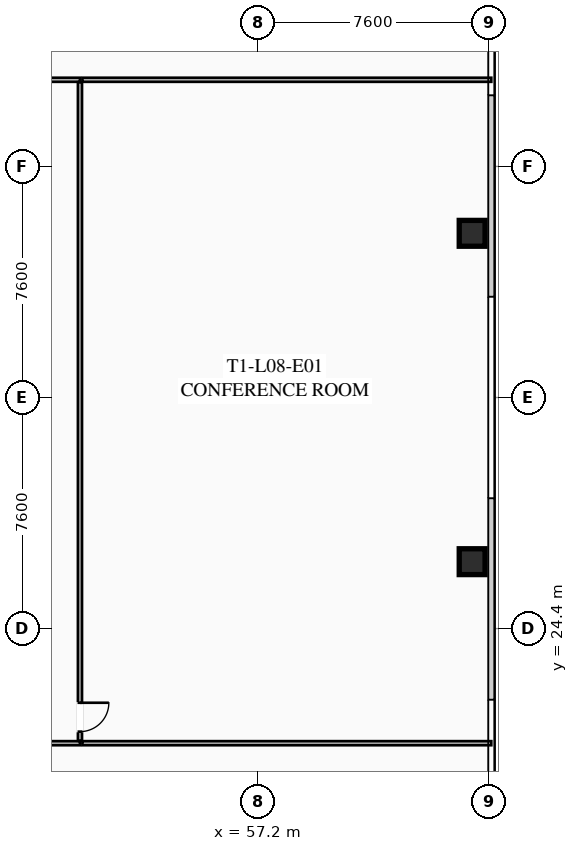
"""IFC4 building model, lengths in metres.
Left out: names, types, materials, properties, quantities, classifications, styles, units other than length and angle.
Written with IfcOpenShell. Run it as: python <this file> out.ifc"""

import sys

from ifc_helpers import new_model, si_unit, direction, frame, frame_2d, origin, origin_2d, place, context, subcontext, project, spatial, rectangle, hollow_rectangle, extrude, element, fill, save


model = new_model("IFC4")
c1 = context("Model", 3, precision=1e-05, world=origin(), true_north=direction((0.0, 1.0)))
c2 = subcontext(c1, "Body", "Model", "MODEL_VIEW")
j1 = project(units=[si_unit("LENGTHUNIT", "METRE"), si_unit("PLANEANGLEUNIT", "RADIAN")], contexts=[c1])
p1 = place(None, origin())
s1 = spatial("IfcSite", under=j1, at=p1, CompositionType="ELEMENT")
p2 = place(p1, origin())
s2 = spatial("IfcBuilding", under=s1, at=p2, CompositionType="ELEMENT")
p3 = place(p2, frame((0.0, 0.0, 35.25)))
s3 = spatial("IfcBuildingStorey", under=s2, at=p3, CompositionType="ELEMENT", Elevation=35.25)
for number, where, z_axis, x_axis in (
    (1, (64.25, 26.6, 0.0), (0.0, 0.0, 1.0), (1.0, 0.0, 0.0)),
    (2, (64.25, 37.4, 0.0), (0.0, 0.0, 1.0), (1.0, 0.0, 0.0)),
):
    element("IfcColumn", number, at=place(p3, frame(where, z_axis=z_axis, x_axis=x_axis)), inside=s3, PredefinedType="COLUMN", context=c2, shape_type="SweptSolid", body=[
        extrude(hollow_rectangle(XDim=0.85, YDim=0.85, WallThickness=0.035, at=origin_2d()), origin(), (0.0, 0.0, 1.0), 3.35),
    ])
p4 = place(p3, frame((22.35, 42.45, 0.0), z_axis=(0.0, 0.0, 1.0), x_axis=(1.0, 0.0, 0.0)))
e3 = element("IfcWall", 3, at=p4, inside=s3, PredefinedType="PARTITIONING", context=c2, shape_type="SweptSolid", body=[
    extrude(rectangle(XDim=29.0, YDim=0.135, at=frame_2d((14.5, 0.0))), origin(), (0.0, 0.0, 1.0), 2.703),
])
p5 = place(p4, frame((0.3, 0.0, 0.0)))
e4 = element("IfcOpeningElement", 4, at=p5, cuts=e3, PredefinedType="OPENING", context=c2, shape_type="SweptSolid", body=[
    extrude(rectangle(XDim=0.95, YDim=2.05, at=frame_2d((0.475, 1.025))), frame((0.0, 0.077, 0.0), z_axis=(0.0, -1.0, 0.0), x_axis=(1.0, 0.0, 0.0)), (0.0, 0.0, 1.0), 0.155),
])
p6 = place(p4, frame((19.12, 0.0, 0.0)))
e5 = element("IfcOpeningElement", 5, at=p6, cuts=e3, PredefinedType="OPENING", context=c2, shape_type="SweptSolid", body=[
    extrude(rectangle(XDim=0.95, YDim=2.05, at=frame_2d((0.475, 1.025))), frame((0.0, 0.077, 0.0), z_axis=(0.0, -1.0, 0.0), x_axis=(1.0, 0.0, 0.0)), (0.0, 0.0, 1.0), 0.155),
])
p7 = place(p4, frame((23.137, 0.0, 0.0)))
e6 = element("IfcOpeningElement", 6, at=p7, cuts=e3, PredefinedType="OPENING", context=c2, shape_type="SweptSolid", body=[
    extrude(rectangle(XDim=0.95, YDim=2.05, at=frame_2d((0.475, 1.025))), frame((0.0, 0.077, 0.0), z_axis=(0.0, -1.0, 0.0), x_axis=(1.0, 0.0, 0.0)), (0.0, 0.0, 1.0), 0.155),
])
p8 = place(p3, frame((51.35, 20.63, 0.0), z_axis=(0.0, 0.0, 1.0), x_axis=(-1.0, 0.0, 0.0)))
e7 = element("IfcWall", 7, at=p8, inside=s3, PredefinedType="PARTITIONING", context=c2, shape_type="SweptSolid", body=[
    extrude(rectangle(XDim=29.0, YDim=0.135, at=frame_2d((14.5, 0.0))), origin(), (0.0, 0.0, 1.0), 2.703),
])
p9 = place(p8, frame((27.67, 0.0, 0.0)))
e8 = element("IfcOpeningElement", 8, at=p9, cuts=e7, PredefinedType="OPENING", context=c2, shape_type="SweptSolid", body=[
    extrude(rectangle(XDim=0.95, YDim=2.05, at=frame_2d((0.475, 1.025))), frame((0.0, 0.077, 0.0), z_axis=(0.0, -1.0, 0.0), x_axis=(1.0, 0.0, 0.0)), (0.0, 0.0, 1.0), 0.155),
])
p10 = place(p8, frame((8.621, 0.0, 0.0)))
e9 = element("IfcOpeningElement", 9, at=p10, cuts=e7, PredefinedType="OPENING", context=c2, shape_type="SweptSolid", body=[
    extrude(rectangle(XDim=0.95, YDim=2.05, at=frame_2d((0.475, 1.025))), frame((0.0, 0.077, 0.0), z_axis=(0.0, -1.0, 0.0), x_axis=(1.0, 0.0, 0.0)), (0.0, 0.0, 1.0), 0.155),
])
p11 = place(p8, frame((4.834, 0.0, 0.0)))
e10 = element("IfcOpeningElement", 10, at=p11, cuts=e7, PredefinedType="OPENING", context=c2, shape_type="SweptSolid", body=[
    extrude(rectangle(XDim=0.95, YDim=2.05, at=frame_2d((0.475, 1.025))), frame((0.0, 0.077, 0.0), z_axis=(0.0, -1.0, 0.0), x_axis=(1.0, 0.0, 0.0)), (0.0, 0.0, 1.0), 0.155),
])
p12 = place(p3, frame((51.35, 42.37, 0.0), z_axis=(0.0, 0.0, 1.0), x_axis=(0.0, -1.0, 0.0)))
e11 = element("IfcWall", 11, at=p12, inside=s3, PredefinedType="PARTITIONING", context=c2, shape_type="SweptSolid", body=[
    extrude(rectangle(XDim=21.66, YDim=0.135, at=frame_2d((10.83, 0.0))), origin(), (0.0, 0.0, 1.0), 2.703),
])
p13 = place(p12, frame((20.41, 0.0, 0.0)))
e12 = element("IfcOpeningElement", 12, at=p13, cuts=e11, PredefinedType="OPENING", context=c2, shape_type="SweptSolid", body=[
    extrude(rectangle(XDim=0.95, YDim=2.05, at=frame_2d((0.475, 1.025))), frame((0.0, 0.077, 0.0), z_axis=(0.0, -1.0, 0.0), x_axis=(1.0, 0.0, 0.0)), (0.0, 0.0, 1.0), 0.155),
])
for number, where, z_axis, x_axis in (
    (13, (64.88, 42.45, 0.0), (0.0, 0.0, 1.0), (-1.0, 0.0, 0.0)),
    (14, (51.43, 20.63, 0.0), (0.0, 0.0, 1.0), (1.0, 0.0, 0.0)),
):
    element("IfcWall", number, at=place(p3, frame(where, z_axis=z_axis, x_axis=x_axis)), inside=s3, PredefinedType="PARTITIONING", context=c2, shape_type="SweptSolid", body=[
        extrude(rectangle(XDim=13.45, YDim=0.135, at=frame_2d((6.725, 0.0))), origin(), (0.0, 0.0, 1.0), 2.703),
    ])
p14 = place(p13, origin())
e15 = element("IfcDoor", 15, at=p14, inside=s3, OperationType="SINGLE_SWING_LEFT", PredefinedType="DOOR", context=c2, shape_type="SweptSolid", body=[
    extrude(rectangle(XDim=0.95, YDim=2.05, at=frame_2d((0.475, 1.025))), frame((0.0, 0.025, 0.0), z_axis=(0.0, -1.0, 0.0), x_axis=(1.0, 0.0, 0.0)), (0.0, 0.0, 1.0), 0.05),
])
fill(e12, e15)
save(model, sys.argv[1])
